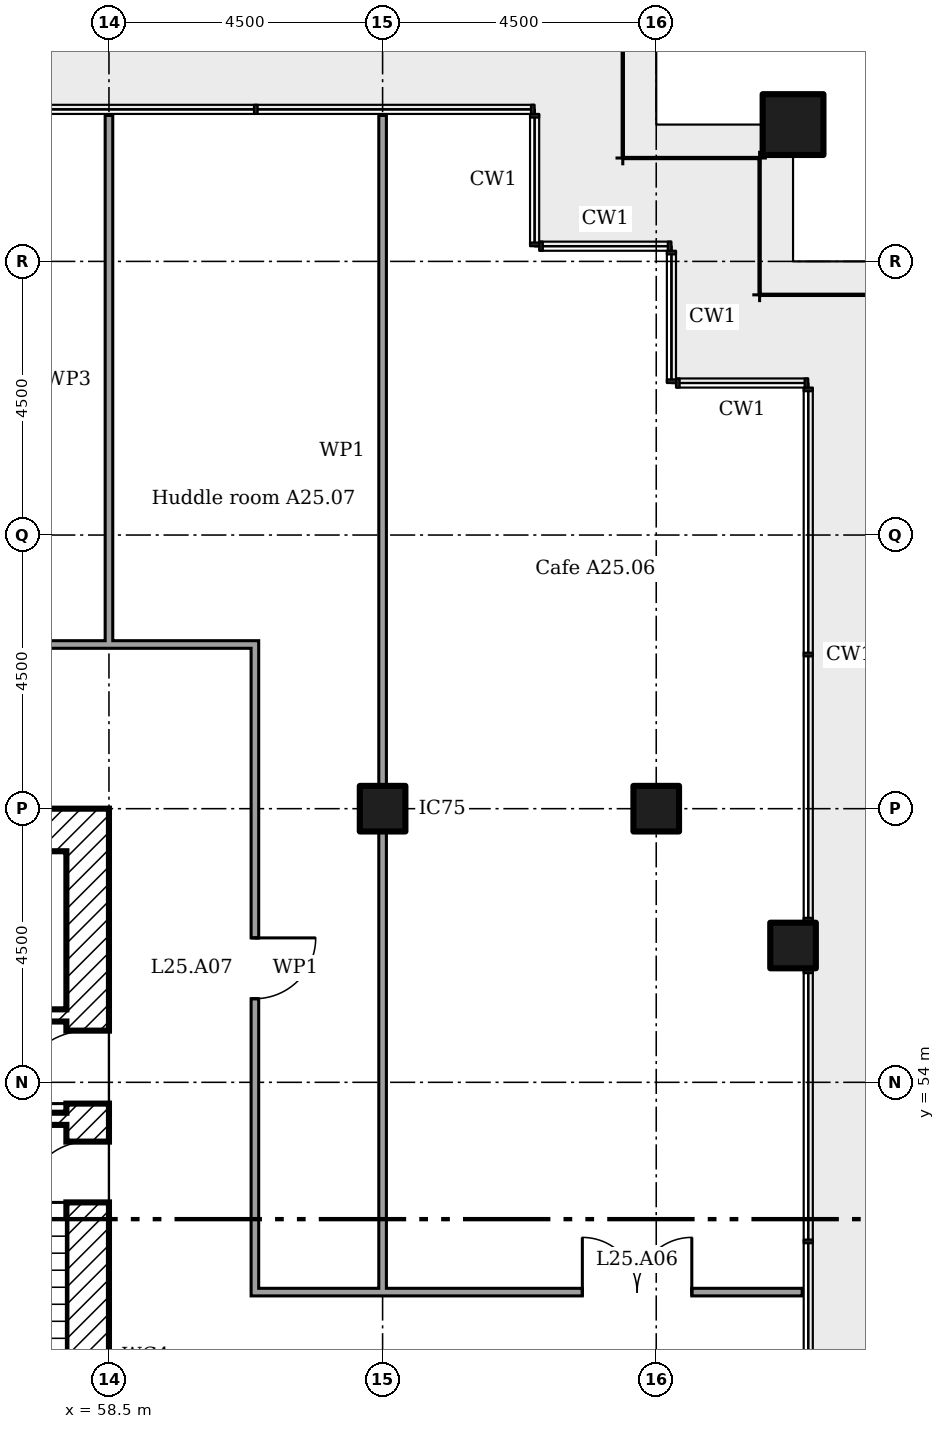
"""IFC4 building model, lengths in metres.
Left out: names, types, materials, properties, quantities, classifications, styles, units other than length and angle.
Written with IfcOpenShell. Run it as: python <this file> out.ifc"""

import sys

from ifc_helpers import new_model, si_unit, direction, frame, frame_2d, origin, origin_2d, place, context, subcontext, project, spatial, rectangle, extrude, element, fill, save


model = new_model("IFC4")
c1 = context("Model", 3, precision=1e-05, world=origin(), true_north=direction((0.0, 1.0)))
c2 = subcontext(c1, "Body", "Model", "MODEL_VIEW")
j1 = project(units=[si_unit("LENGTHUNIT", "METRE"), si_unit("PLANEANGLEUNIT", "RADIAN")], contexts=[c1])
p1 = place(None, origin())
s1 = spatial("IfcSite", under=j1, at=p1, CompositionType="ELEMENT")
p2 = place(p1, origin())
s2 = spatial("IfcBuilding", under=s1, at=p2, CompositionType="ELEMENT")
p3 = place(p2, frame((0.0, 0.0, 102.8)))
s3 = spatial("IfcBuildingStorey", under=s2, at=p3, CompositionType="ELEMENT", Elevation=102.8)
p4 = place(p3, frame((69.75, 69.75, 0.0)))
e1 = element("IfcColumn", 1, at=p4, inside=s3, PredefinedType="COLUMN", context=c2, shape_type="SweptSolid", body=[
    extrude(rectangle(XDim=1.0, YDim=1.0, at=origin_2d()), origin(), (0.0, 0.0, 1.0), 3.6),
])
for number, where in (
    (2, (63.0, 58.5, 0.0)),
    (3, (67.5, 58.5, 0.0)),
    (4, (69.75, 56.25, 0.0)),
):
    element("IfcColumn", number, at=place(p3, frame(where)), inside=s3, PredefinedType="COLUMN", context=c2, shape_type="SweptSolid", body=[
        extrude(rectangle(XDim=0.75, YDim=0.75, at=origin_2d()), origin(), (0.0, 0.0, 1.0), 3.6),
    ])
p5 = place(p3, frame((58.15, 40.5, 0.0), z_axis=(0.0, 0.0, 1.0), x_axis=(0.0, 1.0, 0.0)))
e5 = element("IfcWall", 5, at=p5, inside=s3, PredefinedType="SHEAR", context=c2, shape_type="SweptSolid", body=[
    extrude(rectangle(XDim=18.0, YDim=0.7, at=frame_2d((9.0, 0.0))), origin(), (0.0, 0.0, 1.0), 3.35),
])
p6 = place(p5, frame((13.15, 0.0, 0.0)))
e6 = element("IfcOpeningElement", 6, at=p6, cuts=e5, PredefinedType="OPENING", context=c2, shape_type="SweptSolid", body=[
    extrude(rectangle(XDim=1.2, YDim=2.1, at=frame_2d((0.6, 1.05))), frame((0.0, 0.36, 0.0), z_axis=(0.0, -1.0, 0.0), x_axis=(1.0, 0.0, 0.0)), (0.0, 0.0, 1.0), 0.72),
])
p7 = place(p5, frame((3.9, 0.0, 0.0)))
e7 = element("IfcOpeningElement", 7, at=p7, cuts=e5, PredefinedType="OPENING", context=c2, shape_type="SweptSolid", body=[
    extrude(rectangle(XDim=1.8, YDim=2.1, at=frame_2d((0.9, 1.05))), frame((0.0, 0.36, 0.0), z_axis=(0.0, -1.0, 0.0), x_axis=(1.0, 0.0, 0.0)), (0.0, 0.0, 1.0), 0.72),
])
p8 = place(p5, frame((11.525, 0.0, 0.0)))
e8 = element("IfcOpeningElement", 8, at=p8, cuts=e5, PredefinedType="OPENING", context=c2, shape_type="SweptSolid", body=[
    extrude(rectangle(XDim=1.0, YDim=2.1, at=frame_2d((0.5, 1.05))), frame((0.0, 0.36, 0.0), z_axis=(0.0, -1.0, 0.0), x_axis=(1.0, 0.0, 0.0)), (0.0, 0.0, 1.0), 0.72),
])
p9 = place(p3, frame((41.2, 58.15, 0.0)))
e9 = element("IfcWall", 9, at=p9, inside=s3, PredefinedType="SHEAR", context=c2, shape_type="SweptSolid", body=[
    extrude(rectangle(XDim=16.6, YDim=0.7, at=frame_2d((8.3, 0.0))), origin(), (0.0, 0.0, 1.0), 3.35),
])
p10 = place(p3, frame((46.933, 55.1, 0.0)))
e10 = element("IfcWall", 10, at=p10, inside=s3, PredefinedType="SHEAR", context=c2, shape_type="SweptSolid", body=[
    extrude(rectangle(XDim=10.867, YDim=0.2, at=frame_2d((5.433, 0.0))), origin(), (0.0, 0.0, 1.0), 3.35),
])
p11 = place(p10, frame((8.833, 0.0, 0.0)))
e11 = element("IfcOpeningElement", 11, at=p11, cuts=e10, PredefinedType="OPENING", context=c2, shape_type="SweptSolid", body=[
    extrude(rectangle(XDim=0.9, YDim=2.1, at=frame_2d((0.45, 1.05))), frame((0.0, 0.11, 0.0), z_axis=(0.0, -1.0, 0.0), x_axis=(1.0, 0.0, 0.0)), (0.0, 0.0, 1.0), 0.22),
])
p12 = place(p10, frame((2.117, 0.0, 0.0)))
e12 = element("IfcOpeningElement", 12, at=p12, cuts=e10, PredefinedType="OPENING", context=c2, shape_type="SweptSolid", body=[
    extrude(rectangle(XDim=0.9, YDim=2.1, at=frame_2d((0.45, 1.05))), frame((0.0, 0.11, 0.0), z_axis=(0.0, -1.0, 0.0), x_axis=(1.0, 0.0, 0.0)), (0.0, 0.0, 1.0), 0.22),
])
p13 = place(p10, frame((6.117, 0.0, 0.0)))
e13 = element("IfcOpeningElement", 13, at=p13, cuts=e10, PredefinedType="OPENING", context=c2, shape_type="SweptSolid", body=[
    extrude(rectangle(XDim=0.9, YDim=2.1, at=frame_2d((0.45, 1.05))), frame((0.0, 0.11, 0.0), z_axis=(0.0, -1.0, 0.0), x_axis=(1.0, 0.0, 0.0)), (0.0, 0.0, 1.0), 0.22),
])
p14 = place(p3, frame((54.8, 53.4, 0.0)))
e14 = element("IfcWall", 14, at=p14, inside=s3, PredefinedType="SHEAR", context=c2, shape_type="SweptSolid", body=[
    extrude(rectangle(XDim=3.0, YDim=0.2, at=frame_2d((1.5, 0.0))), origin(), (0.0, 0.0, 1.0), 3.35),
])
p15 = place(p14, frame((0.95, 0.0, 0.0)))
e15 = element("IfcOpeningElement", 15, at=p15, cuts=e14, PredefinedType="OPENING", context=c2, shape_type="SweptSolid", body=[
    extrude(rectangle(XDim=1.0, YDim=2.1, at=frame_2d((0.5, 1.05))), frame((0.0, 0.11, 0.0), z_axis=(0.0, -1.0, 0.0), x_axis=(1.0, 0.0, 0.0)), (0.0, 0.0, 1.0), 0.22),
])
p16 = place(p3, frame((60.837, 50.55, 0.0)))
e16 = element("IfcWall", 16, at=p16, inside=s3, PredefinedType="PARTITIONING", context=c2, shape_type="SweptSolid", body=[
    extrude(rectangle(XDim=9.062, YDim=0.125, at=frame_2d((4.531, 0.0))), origin(), (0.0, 0.0, 1.0), 3.45),
])
p17 = place(p16, frame((5.448, 0.0, 0.0)))
e17 = element("IfcOpeningElement", 17, at=p17, cuts=e16, PredefinedType="OPENING", context=c2, shape_type="SweptSolid", body=[
    extrude(rectangle(XDim=1.8, YDim=2.1, at=frame_2d((0.9, 1.05))), frame((0.0, 0.073, 0.0), z_axis=(0.0, -1.0, 0.0), x_axis=(1.0, 0.0, 0.0)), (0.0, 0.0, 1.0), 0.145),
])
p18 = place(p3, frame((50.488, 61.2, 0.0)))
e18 = element("IfcWall", 18, at=p18, inside=s3, PredefinedType="PARTITIONING", context=c2, shape_type="SweptSolid", body=[
    extrude(rectangle(XDim=10.475, YDim=0.125, at=frame_2d((5.237, 0.0))), origin(), (0.0, 0.0, 1.0), 3.45),
])
p19 = place(p3, frame((58.5, 61.2, 0.0), z_axis=(0.0, 0.0, 1.0), x_axis=(0.0, 1.0, 0.0)))
e19 = element("IfcWall", 19, at=p19, inside=s3, PredefinedType="MOVABLE", context=c2, shape_type="SweptSolid", body=[
    extrude(rectangle(XDim=8.7, YDim=0.125, at=frame_2d((4.35, 0.0))), origin(), (0.0, 0.0, 1.0), 2.766),
])
p20 = place(p3, frame((60.9, 50.613, 0.0), z_axis=(0.0, 0.0, 1.0), x_axis=(0.0, 1.0, 0.0)))
e20 = element("IfcWall", 20, at=p20, inside=s3, PredefinedType="PARTITIONING", context=c2, shape_type="SweptSolid", body=[
    extrude(rectangle(XDim=10.525, YDim=0.125, at=frame_2d((5.262, 0.0))), origin(), (0.0, 0.0, 1.0), 3.45),
])
p21 = place(p20, frame((4.762, 0.0, 0.0)))
e21 = element("IfcOpeningElement", 21, at=p21, cuts=e20, PredefinedType="OPENING", context=c2, shape_type="SweptSolid", body=[
    extrude(rectangle(XDim=1.0, YDim=2.1, at=frame_2d((0.5, 1.05))), frame((0.0, 0.073, 0.0), z_axis=(0.0, -1.0, 0.0), x_axis=(1.0, 0.0, 0.0)), (0.0, 0.0, 1.0), 0.145),
])
p22 = place(p3, frame((63.0, 50.55, 0.0), z_axis=(0.0, 0.0, 1.0), x_axis=(0.0, 1.0, 0.0)))
e22 = element("IfcWall", 22, at=p22, inside=s3, PredefinedType="PARTITIONING", context=c2, shape_type="SweptSolid", body=[
    extrude(rectangle(XDim=7.575, YDim=0.125, at=frame_2d((3.788, 0.0))), origin(), (0.0, 0.0, 1.0), 3.45),
])
p23 = place(p3, frame((63.0, 58.875, 0.0), z_axis=(0.0, 0.0, 1.0), x_axis=(0.0, 1.0, 0.0)))
e23 = element("IfcWall", 23, at=p23, inside=s3, PredefinedType="PARTITIONING", context=c2, shape_type="SweptSolid", body=[
    extrude(rectangle(XDim=11.025, YDim=0.125, at=frame_2d((5.512, 0.0))), origin(), (0.0, 0.0, 1.0), 2.766),
])
p24 = place(p6, origin())
e24 = element("IfcDoor", 24, at=p24, inside=s3, OperationType="SINGLE_SWING_RIGHT", PredefinedType="DOOR", context=c2, shape_type="SweptSolid", body=[
    extrude(rectangle(XDim=1.2, YDim=2.1, at=frame_2d((0.6, 1.05))), frame((0.0, 0.025, 0.0), z_axis=(0.0, -1.0, 0.0), x_axis=(1.0, 0.0, 0.0)), (0.0, 0.0, 1.0), 0.05),
])
fill(e6, e24)
p25 = place(p8, origin())
e25 = element("IfcDoor", 25, at=p25, inside=s3, OperationType="SINGLE_SWING_RIGHT", PredefinedType="DOOR", context=c2, shape_type="SweptSolid", body=[
    extrude(rectangle(XDim=1.0, YDim=2.1, at=frame_2d((0.5, 1.05))), frame((0.0, 0.025, 0.0), z_axis=(0.0, -1.0, 0.0), x_axis=(1.0, 0.0, 0.0)), (0.0, 0.0, 1.0), 0.05),
])
fill(e8, e25)
p26 = place(p17, origin())
e26 = element("IfcDoor", 26, at=p26, inside=s3, OperationType="DOUBLE_DOOR_SINGLE_SWING", PredefinedType="DOOR", context=c2, shape_type="SweptSolid", body=[
    extrude(rectangle(XDim=1.8, YDim=2.1, at=frame_2d((0.9, 1.05))), frame((0.0, 0.025, 0.0), z_axis=(0.0, -1.0, 0.0), x_axis=(1.0, 0.0, 0.0)), (0.0, 0.0, 1.0), 0.05),
])
fill(e17, e26)
p27 = place(p21, frame((1.0, 0.0, 0.0), x_axis=(-1.0, 0.0, 0.0)))
e27 = element("IfcDoor", 27, at=p27, inside=s3, OperationType="SINGLE_SWING_RIGHT", PredefinedType="DOOR", context=c2, shape_type="SweptSolid", body=[
    extrude(rectangle(XDim=1.0, YDim=2.1, at=frame_2d((0.5, 1.05))), frame((0.0, 0.025, 0.0), z_axis=(0.0, -1.0, 0.0), x_axis=(1.0, 0.0, 0.0)), (0.0, 0.0, 1.0), 0.05),
])
fill(e21, e27)
save(model, sys.argv[1])
